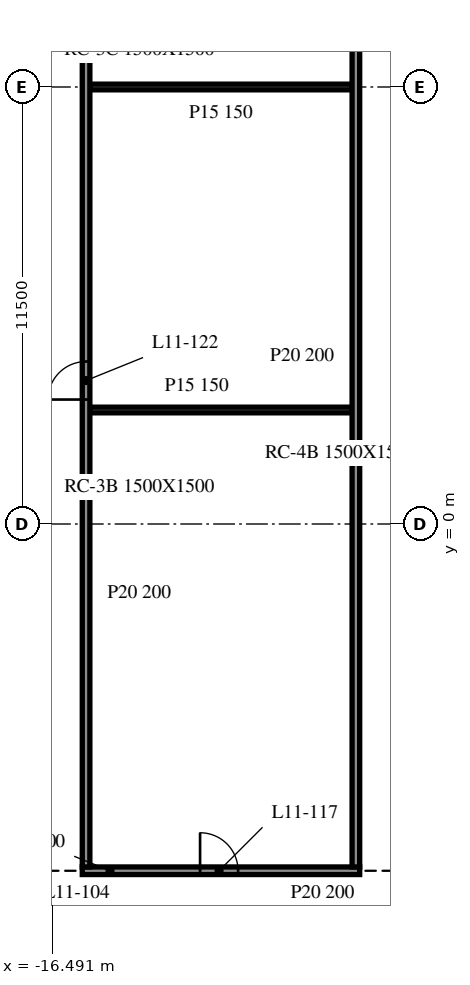
"""IFC4 building model, lengths in metres.
Left out: names, types, materials, properties, quantities, classifications, styles, units other than length and angle.
Written with IfcOpenShell. Run it as: python <this file> out.ifc"""

import sys

from ifc_helpers import new_model, si_unit, direction, frame, frame_2d, origin, place, context, subcontext, project, spatial, rectangle, extrude, element, fill, save


model = new_model("IFC4")
c1 = context("Model", 3, precision=1e-05, world=origin(), true_north=direction((0.0, 1.0)))
c2 = subcontext(c1, "Body", "Model", "MODEL_VIEW")
j1 = project(units=[si_unit("LENGTHUNIT", "METRE"), si_unit("PLANEANGLEUNIT", "RADIAN")], contexts=[c1])
p1 = place(None, origin())
s1 = spatial("IfcSite", under=j1, at=p1, CompositionType="ELEMENT")
p2 = place(p1, origin())
s2 = spatial("IfcBuilding", under=s1, at=p2, CompositionType="ELEMENT")
p3 = place(p2, frame((0.0, 0.0, 50.3)))
s3 = spatial("IfcBuildingStorey", under=s2, at=p3, CompositionType="ELEMENT", Elevation=50.3)
p4 = place(p3, frame((-15.7, -9.125, 0.0), z_axis=(0.0, 0.0, 1.0), x_axis=(1.0, 0.0, 0.0)))
e1 = element("IfcWall", 1, at=p4, inside=s3, PredefinedType="PARTITIONING", context=c2, shape_type="SweptSolid", body=[
    extrude(rectangle(XDim=7.3, YDim=0.2, at=frame_2d((3.65, 0.0))), origin(), (0.0, 0.0, 1.0), 3.96),
])
p5 = place(p4, frame((3.1, 0.0, 0.0)))
e2 = element("IfcOpeningElement", 2, at=p5, cuts=e1, PredefinedType="OPENING", context=c2, shape_type="SweptSolid", body=[
    extrude(rectangle(XDim=1.0, YDim=2.1, at=frame_2d((0.5, 1.05))), frame((0.0, 0.11, 0.0), z_axis=(0.0, -1.0, 0.0), x_axis=(1.0, 0.0, 0.0)), (0.0, 0.0, 1.0), 0.22),
])
for number, where, z_axis, x_axis in (
    (3, (-15.5, 3.0, 0.0), (0.0, 0.0, 1.0), (1.0, 0.0, 0.0)),
    (4, (-15.5, 11.5, 0.0), (0.0, 0.0, 1.0), (1.0, 0.0, 0.0)),
):
    element("IfcWall", number, at=place(p3, frame(where, z_axis=z_axis, x_axis=x_axis)), inside=s3, PredefinedType="PARTITIONING", context=c2, shape_type="SweptSolid", body=[
        extrude(rectangle(XDim=6.9, YDim=0.15, at=frame_2d((3.45, 0.0))), origin(), (0.0, 0.0, 1.0), 3.96),
    ])
p6 = place(p3, frame((-15.6, -9.025, 0.0), z_axis=(0.0, 0.0, 1.0), x_axis=(0.0, 1.0, 0.0)))
e5 = element("IfcWall", 5, at=p6, inside=s3, PredefinedType="PARTITIONING", context=c2, shape_type="SweptSolid", body=[
    extrude(rectangle(XDim=24.05, YDim=0.2, at=frame_2d((12.025, 0.0))), origin(), (0.0, 0.0, 1.0), 3.96),
])
p7 = place(p6, frame((12.3, 0.0, 0.0)))
e6 = element("IfcOpeningElement", 6, at=p7, cuts=e5, PredefinedType="OPENING", context=c2, shape_type="SweptSolid", body=[
    extrude(rectangle(XDim=1.0, YDim=2.1, at=frame_2d((0.5, 1.05))), frame((0.0, 0.11, 0.0), z_axis=(0.0, -1.0, 0.0), x_axis=(1.0, 0.0, 0.0)), (0.0, 0.0, 1.0), 0.22),
])
p8 = place(p3, frame((-8.5, -9.025, 0.0), z_axis=(0.0, 0.0, 1.0), x_axis=(0.0, 1.0, 0.0)))
e7 = element("IfcWall", 7, at=p8, inside=s3, PredefinedType="PARTITIONING", context=c2, shape_type="SweptSolid", body=[
    extrude(rectangle(XDim=24.05, YDim=0.2, at=frame_2d((12.025, 0.0))), origin(), (0.0, 0.0, 1.0), 3.96),
])
p9 = place(p5, origin())
e8 = element("IfcDoor", 8, at=p9, inside=s3, OperationType="SINGLE_SWING_LEFT", PredefinedType="DOOR", context=c2, shape_type="SweptSolid", body=[
    extrude(rectangle(XDim=1.0, YDim=2.1, at=frame_2d((0.5, 1.05))), frame((0.0, 0.025, 0.0), z_axis=(0.0, -1.0, 0.0), x_axis=(1.0, 0.0, 0.0)), (0.0, 0.0, 1.0), 0.05),
])
fill(e2, e8)
p10 = place(p7, origin())
e9 = element("IfcDoor", 9, at=p10, inside=s3, OperationType="SINGLE_SWING_LEFT", PredefinedType="DOOR", context=c2, shape_type="SweptSolid", body=[
    extrude(rectangle(XDim=1.0, YDim=2.1, at=frame_2d((0.5, 1.05))), frame((0.0, 0.025, 0.0), z_axis=(0.0, -1.0, 0.0), x_axis=(1.0, 0.0, 0.0)), (0.0, 0.0, 1.0), 0.05),
])
fill(e6, e9)
save(model, sys.argv[1])
